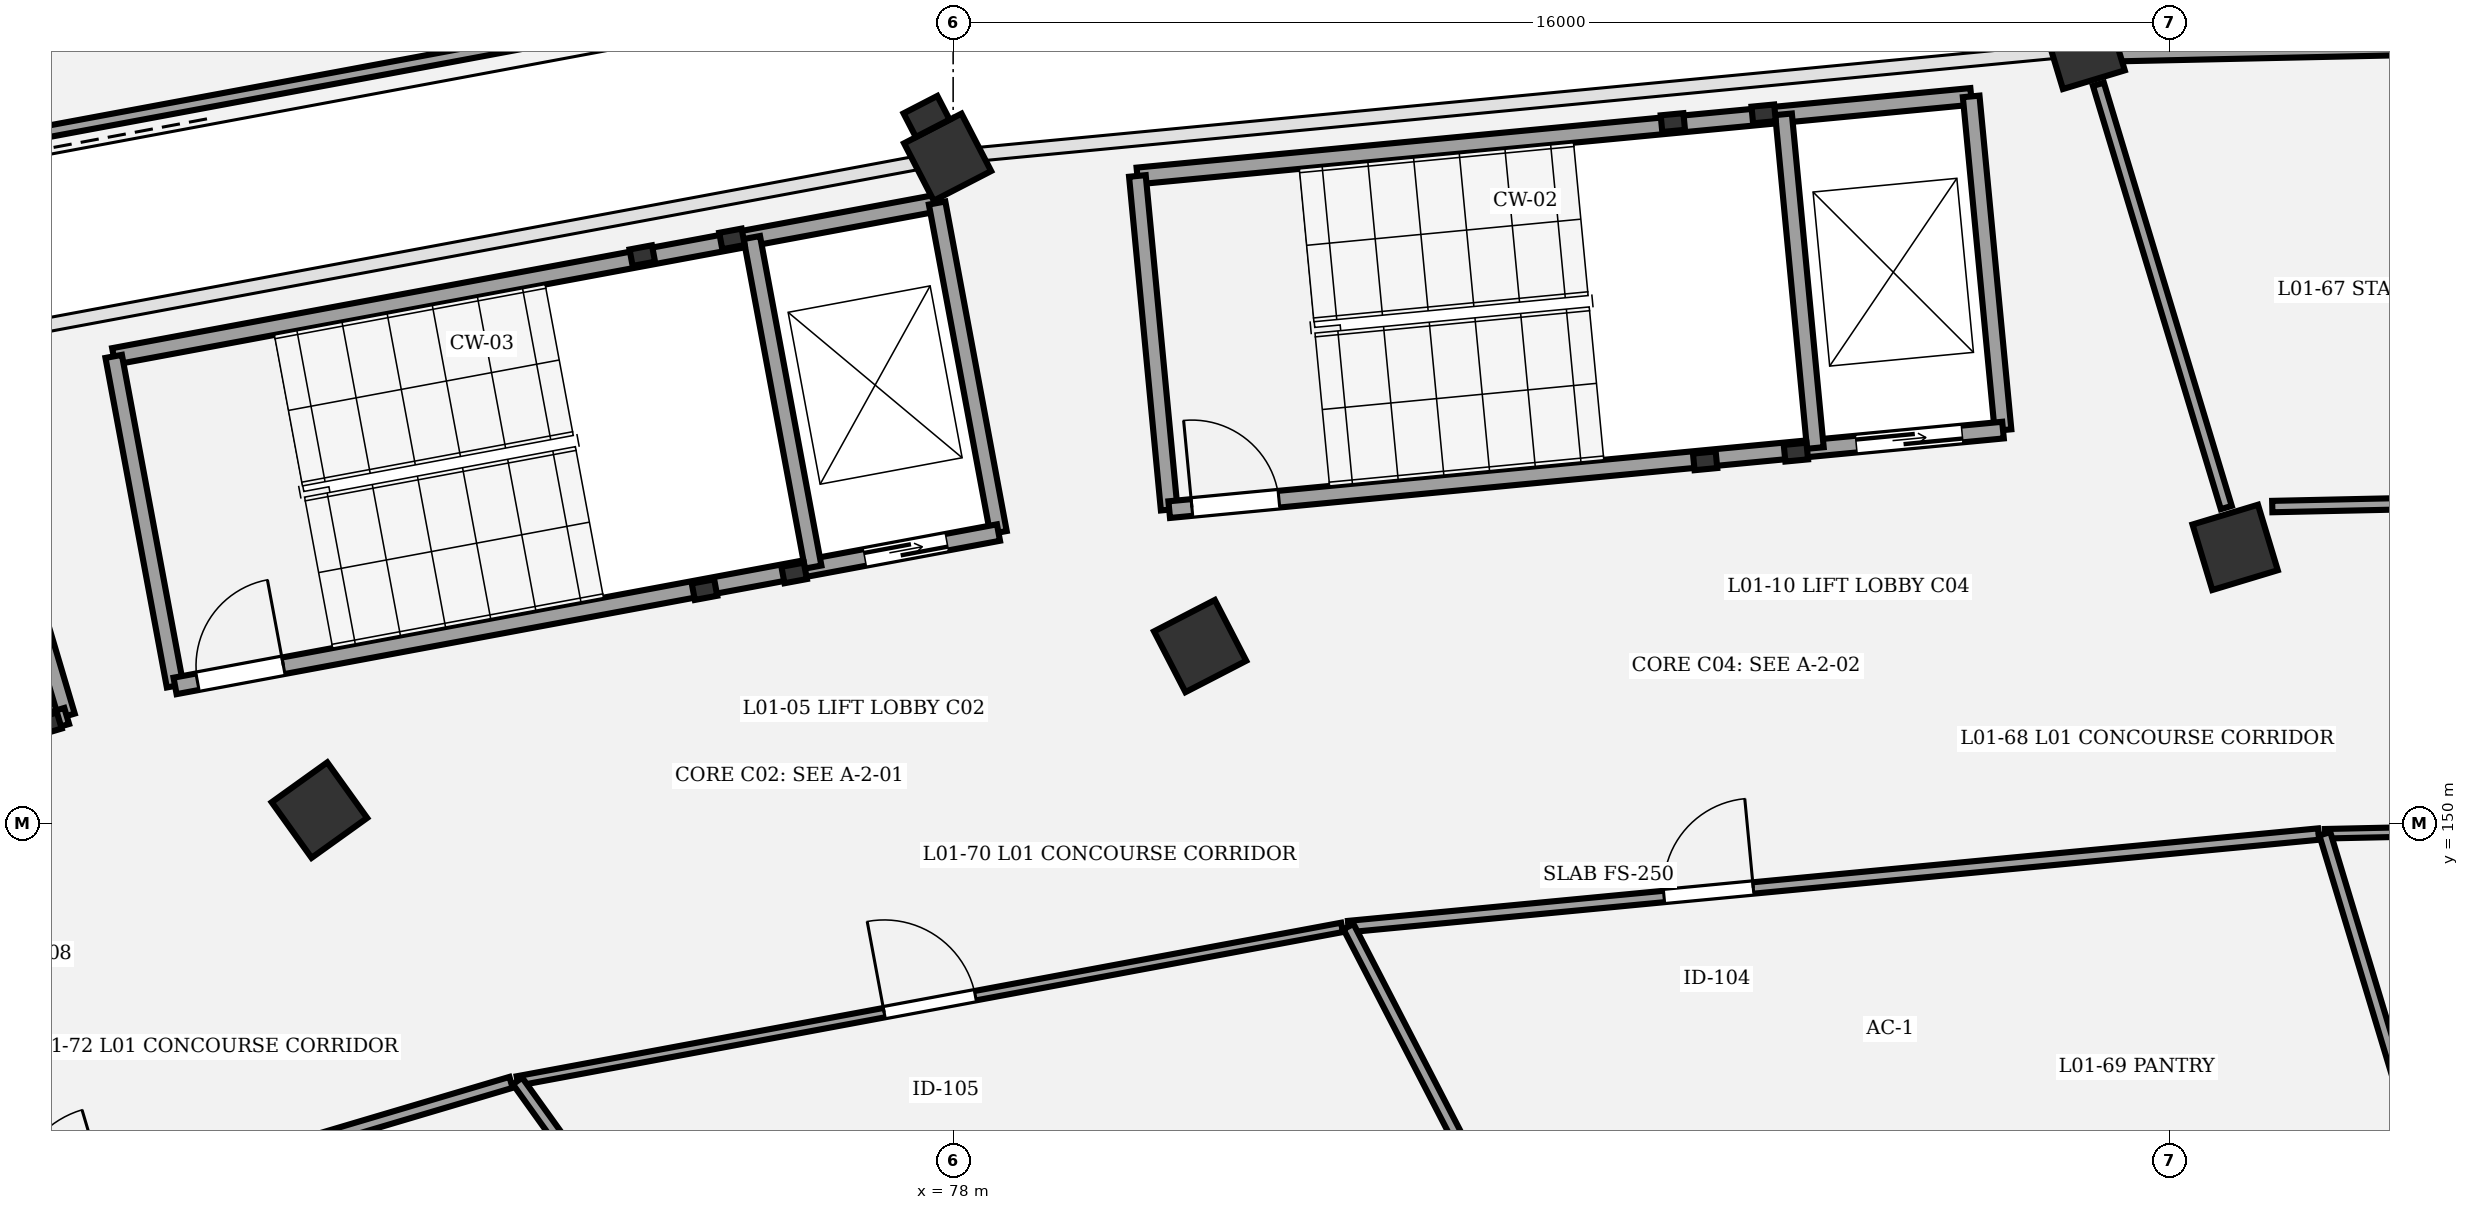
"""IFC4 building model, lengths in metres.
Left out: names, types, materials, properties, quantities, classifications, styles, units other than length and angle.
Written with IfcOpenShell. Run it as: python <this file> out.ifc"""

import sys

from ifc_helpers import new_model, si_unit, direction, frame, frame_2d, origin, origin_2d, place, context, subcontext, project, spatial, rectangle, extrude, element, fill, save


model = new_model("IFC4")
c1 = context("Model", 3, precision=1e-05, world=origin(), true_north=direction((0.0, 1.0)))
c2 = subcontext(c1, "Body", "Model", "MODEL_VIEW")
j1 = project(units=[si_unit("LENGTHUNIT", "METRE"), si_unit("PLANEANGLEUNIT", "RADIAN")], contexts=[c1])
p1 = place(None, origin())
s1 = spatial("IfcSite", under=j1, at=p1, CompositionType="ELEMENT")
p2 = place(p1, origin())
s2 = spatial("IfcBuilding", under=s1, at=p2, CompositionType="ELEMENT")
p3 = place(p2, frame((0.0, 0.0, 5.4)))
s3 = spatial("IfcBuildingStorey", under=s2, at=p3, CompositionType="ELEMENT", Elevation=5.4)
p4 = place(p3, frame((94.867, 153.634, 0.0), z_axis=(0.0, 0.0, 1.0), x_axis=(-0.289198876314, 0.957269037387, 0.0)))
e1 = element("IfcColumn", 1, at=p4, inside=s3, PredefinedType="COLUMN", context=c2, shape_type="SweptSolid", body=[
    extrude(rectangle(XDim=0.9, YDim=0.9, at=origin_2d()), origin(), (0.0, 0.0, 1.0), 4.8),
])
p5 = place(p3, frame((92.885, 160.194, 0.0), z_axis=(0.0, 0.0, 1.0), x_axis=(-0.289198876314, 0.957269037387, 0.0)))
e2 = element("IfcColumn", 2, at=p5, inside=s3, PredefinedType="COLUMN", context=c2, shape_type="SweptSolid", body=[
    extrude(rectangle(XDim=0.85, YDim=0.85, at=origin_2d()), origin(), (0.0, 0.0, 1.0), 4.8),
])
p6 = place(p3, frame((81.25, 152.335, 0.0), z_axis=(0.0, 0.0, 1.0), x_axis=(-0.458959712465, 0.888457079624, 0.0)))
e3 = element("IfcColumn", 3, at=p6, inside=s3, PredefinedType="COLUMN", context=c2, shape_type="SweptSolid", body=[
    extrude(rectangle(XDim=0.9, YDim=0.9, at=origin_2d()), origin(), (0.0, 0.0, 1.0), 4.8),
])
p7 = place(p3, frame((77.927, 158.767, 0.0), z_axis=(0.0, 0.0, 1.0), x_axis=(-0.458959712465, 0.888457079624, 0.0)))
e4 = element("IfcColumn", 4, at=p7, inside=s3, PredefinedType="COLUMN", context=c2, shape_type="SweptSolid", body=[
    extrude(rectangle(XDim=0.85, YDim=0.85, at=origin_2d()), origin(), (0.0, 0.0, 1.0), 4.8),
])
p8 = place(p3, frame((77.65, 159.303, 0.0), z_axis=(0.0, 0.0, 1.0), x_axis=(-0.888457079624, -0.458959712465, 0.0)))
e5 = element("IfcColumn", 5, at=p8, inside=s3, PredefinedType="PILASTER", context=c2, shape_type="SweptSolid", body=[
    extrude(rectangle(XDim=0.5, YDim=0.35, at=origin_2d()), origin(), (0.0, 0.0, 1.0), 4.8),
])
p9 = place(p3, frame((69.662, 150.177, 0.0), z_axis=(0.0, 0.0, 1.0), x_axis=(-0.582974127943, 0.812490717577, 0.0)))
e6 = element("IfcColumn", 6, at=p9, inside=s3, PredefinedType="COLUMN", context=c2, shape_type="SweptSolid", body=[
    extrude(rectangle(XDim=0.9, YDim=0.9, at=origin_2d()), origin(), (0.0, 0.0, 1.0), 4.8),
])
p10 = place(p3, frame((114.577, 160.661, 0.0), z_axis=(0.0, 0.0, 1.0), x_axis=(-0.999768218464, -0.021529267282, 0.0)))
e7 = element("IfcWall", 7, at=p10, inside=s3, PredefinedType="STANDARD", context=c2, shape_type="SweptSolid", body=[
    extrude(rectangle(XDim=21.274, YDim=0.35, at=frame_2d((10.637, 0.0))), origin(), (0.0, 0.0, 1.0), 3.57),
])
p11 = place(p10, frame((9.947, 0.0, 0.9)))
e8 = element("IfcOpeningElement", 8, at=p11, cuts=e7, PredefinedType="OPENING", context=c2, shape_type="SweptSolid", body=[
    extrude(rectangle(XDim=1.38, YDim=1.75, at=frame_2d((0.69, 0.875))), frame((0.0, 0.185, 0.0), z_axis=(0.0, -1.0, 0.0), x_axis=(1.0, 0.0, 0.0)), (0.0, 0.0, 1.0), 0.37),
])
for number, where, z_axis, x_axis in (
    (9, (74.729, 153.078, 0.0), (0.0, 0.0, 1.0), (0.983, 0.183, 0.0)),
    (10, (75.908, 153.298, 0.0), (0.0, 0.0, 1.0), (0.983, 0.183, 0.0)),
    (11, (75.09, 157.692, 0.0), (0.0, 0.0, 1.0), (0.983, 0.183, 0.0)),
    (12, (73.91, 157.473, 0.0), (0.0, 0.0, 1.0), (0.983, 0.183, 0.0)),
):
    element("IfcColumn", number, at=place(p3, frame(where, z_axis=z_axis, x_axis=x_axis)), inside=s3, PredefinedType="COLUMN", context=c2, shape_type="SweptSolid", body=[
        extrude(rectangle(XDim=0.3, YDim=0.22, at=origin_2d()), origin(), (0.0, 0.0, 1.0), 4.8),
    ])
p12 = place(p3, frame((66.955, 156.147, 0.0), z_axis=(0.0, 0.0, 1.0), x_axis=(0.983093434234, 0.183104613723, 0.0)))
e13 = element("IfcWall", 13, at=p12, inside=s3, PredefinedType="SHEAR", context=c2, shape_type="SweptSolid", body=[
    extrude(rectangle(XDim=11.02, YDim=0.22, at=frame_2d((5.51, 0.0))), origin(), (0.0, 0.0, 1.0), 4.55),
])
for number, where, z_axis, x_axis in (
    (14, (67.763, 151.811, 0.0), (0.0, 0.0, 1.0), (-0.183, 0.983, 0.0)),
    (15, (78.596, 153.829, 0.0), (0.0, 0.0, 1.0), (-0.183, 0.983, 0.0)),
):
    element("IfcWall", number, at=place(p3, frame(where, z_axis=z_axis, x_axis=x_axis)), inside=s3, PredefinedType="SHEAR", context=c2, shape_type="SweptSolid", body=[
        extrude(rectangle(XDim=4.41, YDim=0.22, at=frame_2d((2.205, 0.0))), origin(), (0.0, 0.0, 1.0), 4.55),
    ])
p13 = place(p3, frame((67.763, 151.811, 0.0), z_axis=(0.0, 0.0, 1.0), x_axis=(0.983093434234, 0.183104613723, 0.0)))
e16 = element("IfcWall", 16, at=p13, inside=s3, PredefinedType="SHEAR", context=c2, shape_type="SweptSolid", body=[
    extrude(rectangle(XDim=11.02, YDim=0.22, at=frame_2d((5.51, 0.0))), origin(), (0.0, 0.0, 1.0), 4.55),
])
p14 = place(p13, frame((0.3, 0.0, 0.0)))
e17 = element("IfcOpeningElement", 17, at=p14, cuts=e16, PredefinedType="OPENING", context=c2, shape_type="SweptSolid", body=[
    extrude(rectangle(XDim=1.15, YDim=2.15, at=frame_2d((0.575, 1.075))), frame((0.0, 0.12, 0.0), z_axis=(0.0, -1.0, 0.0), x_axis=(1.0, 0.0, 0.0)), (0.0, 0.0, 1.0), 0.24),
])
p15 = place(p13, frame((9.23, 0.0, 0.0)))
e18 = element("IfcOpeningElement", 18, at=p15, cuts=e16, PredefinedType="OPENING", context=c2, shape_type="SweptSolid", body=[
    extrude(rectangle(XDim=1.1, YDim=2.15, at=frame_2d((0.55, 1.075))), frame((0.0, 0.12, 0.0), z_axis=(0.0, -1.0, 0.0), x_axis=(1.0, 0.0, 0.0)), (0.0, 0.0, 1.0), 0.24),
])
p16 = place(p3, frame((76.158, 153.375, 0.0), z_axis=(0.0, 0.0, 1.0), x_axis=(-0.183078394814, 0.983098317236, 0.0)))
e19 = element("IfcWall", 19, at=p16, inside=s3, PredefinedType="SHEAR", context=c2, shape_type="SweptSolid", body=[
    extrude(rectangle(XDim=4.41, YDim=0.22, at=frame_2d((2.205, 0.0))), origin(), (0.0, 0.0, 1.0), 4.55),
])
for number, where, z_axis, x_axis in (
    (20, (87.894, 154.773, 0.0), (0.0, 0.0, 1.0), (0.995, 0.095, 0.0)),
    (21, (89.088, 154.887, 0.0), (0.0, 0.0, 1.0), (0.995, 0.095, 0.0)),
    (22, (88.664, 159.337, 0.0), (0.0, 0.0, 1.0), (0.995, 0.095, 0.0)),
    (23, (87.469, 159.223, 0.0), (0.0, 0.0, 1.0), (0.995, 0.095, 0.0)),
):
    element("IfcColumn", number, at=place(p3, frame(where, z_axis=z_axis, x_axis=x_axis)), inside=s3, PredefinedType="COLUMN", context=c2, shape_type="SweptSolid", body=[
        extrude(rectangle(XDim=0.3, YDim=0.22, at=origin_2d()), origin(), (0.0, 0.0, 1.0), 4.8),
    ])
p17 = place(p3, frame((80.424, 158.521, 0.0), z_axis=(0.0, 0.0, 1.0), x_axis=(0.99547962713, 0.094975322952, 0.0)))
e24 = element("IfcWall", 24, at=p17, inside=s3, PredefinedType="SHEAR", context=c2, shape_type="SweptSolid", body=[
    extrude(rectangle(XDim=11.02, YDim=0.22, at=frame_2d((5.51, 0.0))), origin(), (0.0, 0.0, 1.0), 4.55),
])
for number, where, z_axis, x_axis in (
    (25, (80.843, 154.13, 0.0), (0.0, 0.0, 1.0), (-0.095, 0.995, 0.0)),
    (26, (91.813, 155.177, 0.0), (0.0, 0.0, 1.0), (-0.095, 0.995, 0.0)),
):
    element("IfcWall", number, at=place(p3, frame(where, z_axis=z_axis, x_axis=x_axis)), inside=s3, PredefinedType="SHEAR", context=c2, shape_type="SweptSolid", body=[
        extrude(rectangle(XDim=4.41, YDim=0.22, at=frame_2d((2.205, 0.0))), origin(), (0.0, 0.0, 1.0), 4.55),
    ])
p18 = place(p3, frame((80.843, 154.13, 0.0), z_axis=(0.0, 0.0, 1.0), x_axis=(0.995479427285, 0.094977417594, 0.0)))
e27 = element("IfcWall", 27, at=p18, inside=s3, PredefinedType="SHEAR", context=c2, shape_type="SweptSolid", body=[
    extrude(rectangle(XDim=11.02, YDim=0.22, at=frame_2d((5.51, 0.0))), origin(), (0.0, 0.0, 1.0), 4.55),
])
p19 = place(p18, frame((0.3, 0.0, 0.0)))
e28 = element("IfcOpeningElement", 28, at=p19, cuts=e27, PredefinedType="OPENING", context=c2, shape_type="SweptSolid", body=[
    extrude(rectangle(XDim=1.15, YDim=2.15, at=frame_2d((0.575, 1.075))), frame((0.0, 0.12, 0.0), z_axis=(0.0, -1.0, 0.0), x_axis=(1.0, 0.0, 0.0)), (0.0, 0.0, 1.0), 0.24),
])
p20 = place(p18, frame((9.08, 0.0, 0.0)))
e29 = element("IfcOpeningElement", 29, at=p20, cuts=e27, PredefinedType="OPENING", context=c2, shape_type="SweptSolid", body=[
    extrude(rectangle(XDim=1.4, YDim=2.25, at=frame_2d((0.7, 1.125))), frame((0.0, 0.12, 0.0), z_axis=(0.0, -1.0, 0.0), x_axis=(1.0, 0.0, 0.0)), (0.0, 0.0, 1.0), 0.24),
])
p21 = place(p3, frame((89.344, 154.941, 0.0), z_axis=(0.0, 0.0, 1.0), x_axis=(-0.094942328893, 0.995482774429, 0.0)))
e30 = element("IfcWall", 30, at=p21, inside=s3, PredefinedType="SHEAR", context=c2, shape_type="SweptSolid", body=[
    extrude(rectangle(XDim=4.41, YDim=0.22, at=frame_2d((2.205, 0.0))), origin(), (0.0, 0.0, 1.0), 4.55),
])
p22 = place(p3, frame((66.096, 151.313, 0.0), z_axis=(0.0, 0.0, 1.0), x_axis=(0.958670893355, 0.284517342588, 0.0)))
e31 = element("IfcColumn", 31, at=p22, inside=s3, PredefinedType="COLUMN", context=c2, shape_type="SweptSolid", body=[
    extrude(rectangle(XDim=0.3, YDim=0.22, at=origin_2d()), origin(), (0.0, 0.0, 1.0), 4.8),
])
p23 = place(p3, frame((66.337, 151.416, 0.0), z_axis=(0.0, 0.0, 1.0), x_axis=(-0.284497328872, 0.958676832861, 0.0)))
e32 = element("IfcWall", 32, at=p23, inside=s3, PredefinedType="SHEAR", context=c2, shape_type="SweptSolid", body=[
    extrude(rectangle(XDim=4.41, YDim=0.22, at=frame_2d((2.205, 0.0))), origin(), (0.0, 0.0, 1.0), 4.55),
])
p24 = place(p3, frame((58.15, 148.986, 0.0), z_axis=(0.0, 0.0, 1.0), x_axis=(0.958665631999, 0.284535069937, 0.0)))
e33 = element("IfcWall", 33, at=p24, inside=s3, PredefinedType="SHEAR", context=c2, shape_type="SweptSolid", body=[
    extrude(rectangle(XDim=8.54, YDim=0.22, at=frame_2d((4.27, 0.0))), origin(), (0.0, 0.0, 1.0), 4.55),
])
p25 = place(p24, frame((0.3, 0.0, 0.0)))
e34 = element("IfcOpeningElement", 34, at=p25, cuts=e33, PredefinedType="OPENING", context=c2, shape_type="SweptSolid", body=[
    extrude(rectangle(XDim=1.15, YDim=2.15, at=frame_2d((0.575, 1.075))), frame((0.0, 0.12, 0.0), z_axis=(0.0, -1.0, 0.0), x_axis=(1.0, 0.0, 0.0)), (0.0, 0.0, 1.0), 0.24),
])
p26 = place(p3, frame((96.047, 149.866, 0.0), z_axis=(0.0, 0.0, 1.0), x_axis=(0.999768266483, 0.021527037261, 0.0)))
e35 = element("IfcWall", 35, at=p26, inside=s3, PredefinedType="PARTITIONING", context=c2, shape_type="SweptSolid", body=[
    extrude(rectangle(XDim=18.917, YDim=0.125, at=frame_2d((9.458, 0.0))), origin(), (0.0, 0.0, 1.0), 3.55),
])
p27 = place(p26, frame((8.908, 0.0, 0.0)))
e36 = element("IfcOpeningElement", 36, at=p27, cuts=e35, PredefinedType="OPENING", context=c2, shape_type="SweptSolid", body=[
    extrude(rectangle(XDim=1.1, YDim=2.3, at=frame_2d((0.55, 1.15))), frame((0.0, 0.073, 0.0), z_axis=(0.0, -1.0, 0.0), x_axis=(1.0, 0.0, 0.0)), (0.0, 0.0, 1.0), 0.145),
])
p28 = place(p3, frame((114.489, 154.583, 0.0), z_axis=(0.0, 0.0, 1.0), x_axis=(-0.999768107727, -0.021534409017, 0.0)))
e37 = element("IfcWall", 37, at=p28, inside=s3, PredefinedType="PARTITIONING", context=c2, shape_type="SweptSolid", body=[
    extrude(rectangle(XDim=19.137, YDim=0.15, at=frame_2d((9.569, 0.0))), origin(), (0.0, 0.0, 1.0), 3.55),
])
p29 = place(p28, frame((8.999, 0.0, 0.0)))
e38 = element("IfcOpeningElement", 38, at=p29, cuts=e37, PredefinedType="OPENING", context=c2, shape_type="SweptSolid", body=[
    extrude(rectangle(XDim=1.14, YDim=2.3, at=frame_2d((0.57, 1.15))), frame((0.0, 0.085, 0.0), z_axis=(0.0, -1.0, 0.0), x_axis=(1.0, 0.0, 0.0)), (0.0, 0.0, 1.0), 0.17),
])
p30 = place(p3, frame((83.201, 148.645, 0.0), z_axis=(0.0, 0.0, 1.0), x_axis=(0.995485111947, 0.094917816515, 0.0)))
e39 = element("IfcWall", 39, at=p30, inside=s3, PredefinedType="PARTITIONING", context=c2, shape_type="SweptSolid", body=[
    extrude(rectangle(XDim=12.822, YDim=0.15, at=frame_2d((6.411, 0.0))), origin(), (0.0, 0.0, 1.0), 3.55),
])
p31 = place(p30, frame((4.171, 0.0, 0.0)))
e40 = element("IfcOpeningElement", 40, at=p31, cuts=e39, PredefinedType="OPENING", context=c2, shape_type="SweptSolid", body=[
    extrude(rectangle(XDim=1.18, YDim=2.3, at=frame_2d((0.59, 1.15))), frame((0.0, 0.085, 0.0), z_axis=(0.0, -1.0, 0.0), x_axis=(1.0, 0.0, 0.0)), (0.0, 0.0, 1.0), 0.17),
])
p32 = place(p3, frame((72.268, 146.614, 0.0), z_axis=(0.0, 0.0, 1.0), x_axis=(0.983097372707, 0.183083466695, 0.0)))
e41 = element("IfcWall", 41, at=p32, inside=s3, PredefinedType="PARTITIONING", context=c2, shape_type="SweptSolid", body=[
    extrude(rectangle(XDim=11.035, YDim=0.125, at=frame_2d((5.517, 0.0))), origin(), (0.0, 0.0, 1.0), 3.55),
])
p33 = place(p32, frame((4.907, 0.0, 0.0)))
e42 = element("IfcOpeningElement", 42, at=p33, cuts=e41, PredefinedType="OPENING", context=c2, shape_type="SweptSolid", body=[
    extrude(rectangle(XDim=1.22, YDim=2.3, at=frame_2d((0.61, 1.15))), frame((0.0, 0.073, 0.0), z_axis=(0.0, -1.0, 0.0), x_axis=(1.0, 0.0, 0.0)), (0.0, 0.0, 1.0), 0.145),
])
p34 = place(p3, frame((62.701, 143.781, 0.0), z_axis=(0.0, 0.0, 1.0), x_axis=(0.958655809656, 0.284568161629, 0.0)))
e43 = element("IfcWall", 43, at=p34, inside=s3, PredefinedType="PARTITIONING", context=c2, shape_type="SweptSolid", body=[
    extrude(rectangle(XDim=9.891, YDim=0.15, at=frame_2d((4.946, 0.0))), origin(), (0.0, 0.0, 1.0), 3.55),
])
p35 = place(p34, frame((3.117, 0.0, 0.0)))
e44 = element("IfcOpeningElement", 44, at=p35, cuts=e43, PredefinedType="OPENING", context=c2, shape_type="SweptSolid", body=[
    extrude(rectangle(XDim=1.26, YDim=2.3, at=frame_2d((0.63, 1.15))), frame((0.0, 0.085, 0.0), z_axis=(0.0, -1.0, 0.0), x_axis=(1.0, 0.0, 0.0)), (0.0, 0.0, 1.0), 0.17),
])
p36 = place(p3, frame((97.473, 145.148, 0.0), z_axis=(0.0, 0.0, 1.0), x_axis=(-0.289237529827, 0.957257358989, 0.0)))
e45 = element("IfcWall", 45, at=p36, inside=s3, PredefinedType="PARTITIONING", context=c2, shape_type="SweptSolid", body=[
    extrude(rectangle(XDim=4.929, YDim=0.15, at=frame_2d((2.465, 0.0))), origin(), (0.0, 0.0, 1.0), 3.55),
])
p37 = place(p3, frame((94.751, 154.158, 0.0), z_axis=(0.0, 0.0, 1.0), x_axis=(-0.289195444178, 0.957270074256, 0.0)))
e46 = element("IfcWall", 46, at=p37, inside=s3, PredefinedType="PARTITIONING", context=c2, shape_type="SweptSolid", body=[
    extrude(rectangle(XDim=5.817, YDim=0.15, at=frame_2d((2.909, 0.0))), origin(), (0.0, 0.0, 1.0), 3.55),
])
p38 = place(p3, frame((85.603, 143.996, 0.0), z_axis=(0.0, 0.0, 1.0), x_axis=(-0.458969721202, 0.888451909233, 0.0)))
e47 = element("IfcWall", 47, at=p38, inside=s3, PredefinedType="PARTITIONING", context=c2, shape_type="SweptSolid", body=[
    extrude(rectangle(XDim=5.233, YDim=0.15, at=frame_2d((2.616, 0.0))), origin(), (0.0, 0.0, 1.0), 3.55),
])
p39 = place(p3, frame((75.511, 142.096, 0.0), z_axis=(0.0, 0.0, 1.0), x_axis=(-0.583030732909, 0.812450099688, 0.0)))
e48 = element("IfcWall", 48, at=p39, inside=s3, PredefinedType="PARTITIONING", context=c2, shape_type="SweptSolid", body=[
    extrude(rectangle(XDim=5.561, YDim=0.15, at=frame_2d((2.781, 0.0))), origin(), (0.0, 0.0, 1.0), 3.55),
])
p40 = place(p3, frame((77.469, 161.225, 0.0), z_axis=(0.0, 0.0, 1.0), x_axis=(-0.983094545276, -0.183098648406, 0.0)))
e49 = element("IfcWall", 49, at=p40, inside=s3, PredefinedType="PARTITIONING", context=c2, shape_type="SweptSolid", body=[
    extrude(rectangle(XDim=12.947, YDim=0.15, at=frame_2d((6.474, 0.0))), origin(), (0.0, 0.0, 1.0), 3.55),
])
p41 = place(p14, origin())
e50 = element("IfcDoor", 50, at=p41, inside=s3, OperationType="SINGLE_SWING_RIGHT", PredefinedType="DOOR", context=c2, shape_type="SweptSolid", body=[
    extrude(rectangle(XDim=1.15, YDim=2.15, at=frame_2d((0.575, 1.075))), frame((0.0, 0.025, 0.0), z_axis=(0.0, -1.0, 0.0), x_axis=(1.0, 0.0, 0.0)), (0.0, 0.0, 1.0), 0.05),
])
fill(e17, e50)
p42 = place(p15, origin())
e51 = element("IfcDoor", 51, at=p42, inside=s3, OperationType="DOUBLE_DOOR_SLIDING", PredefinedType="DOOR", context=c2, shape_type="SweptSolid", body=[
    extrude(rectangle(XDim=1.1, YDim=2.15, at=frame_2d((0.55, 1.075))), frame((0.0, 0.025, 0.0), z_axis=(0.0, -1.0, 0.0), x_axis=(1.0, 0.0, 0.0)), (0.0, 0.0, 1.0), 0.05),
])
fill(e18, e51)
p43 = place(p19, origin())
e52 = element("IfcDoor", 52, at=p43, inside=s3, OperationType="SINGLE_SWING_LEFT", PredefinedType="DOOR", context=c2, shape_type="SweptSolid", body=[
    extrude(rectangle(XDim=1.15, YDim=2.15, at=frame_2d((0.575, 1.075))), frame((0.0, 0.025, 0.0), z_axis=(0.0, -1.0, 0.0), x_axis=(1.0, 0.0, 0.0)), (0.0, 0.0, 1.0), 0.05),
])
fill(e28, e52)
p44 = place(p20, origin())
e53 = element("IfcDoor", 53, at=p44, inside=s3, OperationType="DOUBLE_DOOR_SLIDING", PredefinedType="DOOR", context=c2, shape_type="SweptSolid", body=[
    extrude(rectangle(XDim=1.4, YDim=2.25, at=frame_2d((0.7, 1.125))), frame((0.0, 0.025, 0.0), z_axis=(0.0, -1.0, 0.0), x_axis=(1.0, 0.0, 0.0)), (0.0, 0.0, 1.0), 0.05),
])
fill(e29, e53)
p45 = place(p31, origin())
e54 = element("IfcDoor", 54, at=p45, inside=s3, OperationType="SINGLE_SWING_RIGHT", PredefinedType="DOOR", context=c2, shape_type="SweptSolid", body=[
    extrude(rectangle(XDim=1.18, YDim=2.3, at=frame_2d((0.59, 1.15))), frame((0.0, 0.025, 0.0), z_axis=(0.0, -1.0, 0.0), x_axis=(1.0, 0.0, 0.0)), (0.0, 0.0, 1.0), 0.05),
])
fill(e40, e54)
p46 = place(p33, origin())
e55 = element("IfcDoor", 55, at=p46, inside=s3, OperationType="SINGLE_SWING_LEFT", PredefinedType="DOOR", context=c2, shape_type="SweptSolid", body=[
    extrude(rectangle(XDim=1.22, YDim=2.3, at=frame_2d((0.61, 1.15))), frame((0.0, 0.025, 0.0), z_axis=(0.0, -1.0, 0.0), x_axis=(1.0, 0.0, 0.0)), (0.0, 0.0, 1.0), 0.05),
])
fill(e42, e55)
save(model, sys.argv[1])
